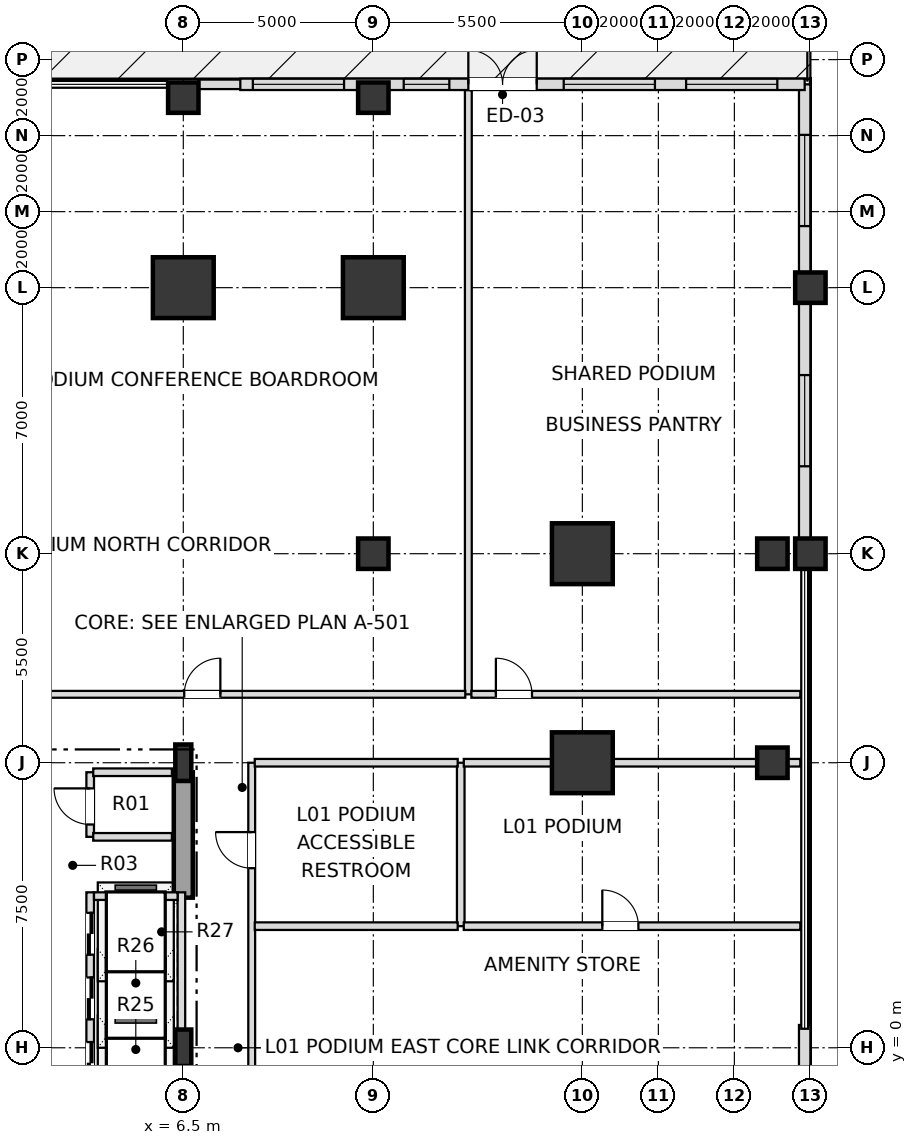
"""IFC4 building model, lengths in metres.
Left out: names, types, materials, properties, quantities, classifications, styles, units other than length and angle.
Written with IfcOpenShell. Run it as: python <this file> out.ifc"""

import sys

from ifc_helpers import new_model, si_unit, direction, frame, frame_2d, origin, origin_2d, place, context, subcontext, project, spatial, rectangle, i_section, extrude, element, fill, save


model = new_model("IFC4")
c1 = context("Model", 3, precision=1e-05, world=origin(), true_north=direction((0.0, 1.0)))
c2 = subcontext(c1, "Body", "Model", "MODEL_VIEW")
j1 = project(units=[si_unit("LENGTHUNIT", "METRE"), si_unit("PLANEANGLEUNIT", "RADIAN")], contexts=[c1])
p1 = place(None, origin())
s1 = spatial("IfcSite", under=j1, at=p1, CompositionType="ELEMENT")
p2 = place(p1, origin())
s2 = spatial("IfcBuilding", under=s1, at=p2, CompositionType="ELEMENT")
p3 = place(p2, frame((0.0, 0.0, 6.0)))
s3 = spatial("IfcBuildingStorey", under=s2, at=p3, CompositionType="ELEMENT", Elevation=6.0)
for number, where, z_axis, x_axis in (
    (1, (6.5, 0.0, 0.0), (0.0, 0.0, 1.0), (1.0, 0.0, 0.0)),
    (2, (6.5, 7.5, 0.0), (0.0, 0.0, 1.0), (1.0, 0.0, 0.0)),
):
    element("IfcColumn", number, at=place(p3, frame(where, z_axis=z_axis, x_axis=x_axis)), inside=s3, PredefinedType="COLUMN", context=c2, shape_type="SweptSolid", body=[
        extrude(i_section(OverallWidth=0.42, OverallDepth=0.96, WebThickness=0.022, FlangeThickness=0.034, at=origin_2d()), origin(), (0.0, 0.0, 1.0), 5.4),
    ])
for number, where, z_axis, x_axis in (
    (3, (17.0, 7.5, 0.0), (0.0, 0.0, 1.0), (1.0, 0.0, 0.0)),
    (4, (17.0, 13.0, 0.0), (0.0, 0.0, 1.0), (1.0, 0.0, 0.0)),
    (5, (11.5, 20.0, 0.0), (0.0, 0.0, 1.0), (1.0, 0.0, 0.0)),
    (6, (6.5, 20.0, 0.0), (0.0, 0.0, 1.0), (1.0, 0.0, 0.0)),
):
    element("IfcColumn", number, at=place(p3, frame(where, z_axis=z_axis, x_axis=x_axis)), inside=s3, PredefinedType="USERDEFINED", context=c2, shape_type="SweptSolid", body=[
        extrude(rectangle(XDim=1.6, YDim=1.6, at=origin_2d()), origin(), (0.0, 0.0, 1.0), 5.4),
    ])
for number, where, z_axis, x_axis in (
    (7, (23.0, 13.0, 0.0), (0.0, 0.0, 1.0), (1.0, 0.0, 0.0)),
    (8, (23.0, 20.0, 0.0), (0.0, 0.0, 1.0), (1.0, 0.0, 0.0)),
    (9, (11.5, 13.0, 0.0), (0.0, 0.0, 1.0), (1.0, 0.0, 0.0)),
    (10, (6.5, 25.0, 0.0), (0.0, 0.0, 1.0), (1.0, 0.0, 0.0)),
    (11, (11.5, 25.0, 0.0), (0.0, 0.0, 1.0), (1.0, 0.0, 0.0)),
    (12, (22.0, 7.5, 0.0), (0.0, 0.0, 1.0), (1.0, 0.0, 0.0)),
    (13, (22.0, 13.0, 0.0), (0.0, 0.0, 1.0), (1.0, 0.0, 0.0)),
):
    element("IfcColumn", number, at=place(p3, frame(where, z_axis=z_axis, x_axis=x_axis)), inside=s3, PredefinedType="COLUMN", context=c2, shape_type="SweptSolid", body=[
        extrude(rectangle(XDim=0.8, YDim=0.8, at=origin_2d()), origin(), (0.0, 0.0, 1.0), 5.4),
    ])
p4 = place(p3, frame((22.85, -0.6, 0.0), z_axis=(0.0, 0.0, 1.0), x_axis=(0.0, 1.0, 0.0)))
e14 = element("IfcWall", 14, at=p4, inside=s3, PredefinedType="SOLIDWALL", context=c2, shape_type="SweptSolid", body=[
    extrude(rectangle(XDim=1.2, YDim=0.3, at=frame_2d((0.6, 0.0))), origin(), (0.0, 0.0, 1.0), 4.476),
])
p5 = place(p3, frame((22.85, 13.0, 0.0), z_axis=(0.0, 0.0, 1.0), x_axis=(0.0, 1.0, 0.0)))
e15 = element("IfcWall", 15, at=p5, inside=s3, PredefinedType="SOLIDWALL", context=c2, shape_type="SweptSolid", body=[
    extrude(rectangle(XDim=12.35, YDim=0.3, at=frame_2d((6.175, 0.0))), origin(), (0.0, 0.0, 1.0), 4.476),
])
p6 = place(p5, frame((2.3, 0.0, 0.8)))
e16 = element("IfcOpeningElement", 16, at=p6, cuts=e15, PredefinedType="OPENING", context=c2, shape_type="SweptSolid", body=[
    extrude(rectangle(XDim=2.4, YDim=2.2, at=frame_2d((1.2, 1.1))), frame((0.0, 0.16, 0.0), z_axis=(0.0, -1.0, 0.0), x_axis=(1.0, 0.0, 0.0)), (0.0, 0.0, 1.0), 0.32),
])
p7 = place(p5, frame((8.62, 0.0, 0.8)))
e17 = element("IfcOpeningElement", 17, at=p7, cuts=e15, PredefinedType="OPENING", context=c2, shape_type="SweptSolid", body=[
    extrude(rectangle(XDim=2.4, YDim=2.2, at=frame_2d((1.2, 1.1))), frame((0.0, 0.16, 0.0), z_axis=(0.0, -1.0, 0.0), x_axis=(1.0, 0.0, 0.0)), (0.0, 0.0, 1.0), 0.32),
])
p8 = place(p3, frame((8.025, 25.35, 0.0), z_axis=(0.0, 0.0, 1.0), x_axis=(-1.0, 0.0, 0.0)))
e18 = element("IfcWall", 18, at=p8, inside=s3, PredefinedType="SOLIDWALL", context=c2, shape_type="SweptSolid", body=[
    extrude(rectangle(XDim=1.13, YDim=0.25, at=frame_2d((0.565, 0.0))), origin(), (0.0, 0.0, 1.0), 4.476),
])
p9 = place(p3, frame((8.0, 25.35, 0.0), z_axis=(0.0, 0.0, 1.0), x_axis=(1.0, 0.0, 0.0)))
e19 = element("IfcWall", 19, at=p9, inside=s3, PredefinedType="SOLIDWALL", context=c2, shape_type="SweptSolid", body=[
    extrude(rectangle(XDim=14.85, YDim=0.3, at=frame_2d((7.425, 0.0))), origin(), (0.0, 0.0, 1.0), 4.476),
])
p10 = place(p9, frame((6.0, 0.0, 0.0)))
e20 = element("IfcOpeningElement", 20, at=p10, cuts=e19, PredefinedType="OPENING", context=c2, shape_type="SweptSolid", body=[
    extrude(rectangle(XDim=1.8, YDim=2.3, at=frame_2d((0.9, 1.15))), frame((0.0, 0.16, 0.0), z_axis=(0.0, -1.0, 0.0), x_axis=(1.0, 0.0, 0.0)), (0.0, 0.0, 1.0), 0.32),
])
p11 = place(p9, frame((0.33, 0.0, 0.8)))
e21 = element("IfcOpeningElement", 21, at=p11, cuts=e19, PredefinedType="OPENING", context=c2, shape_type="SweptSolid", body=[
    extrude(rectangle(XDim=2.4, YDim=2.2, at=frame_2d((1.2, 1.1))), frame((0.0, 0.16, 0.0), z_axis=(0.0, -1.0, 0.0), x_axis=(1.0, 0.0, 0.0)), (0.0, 0.0, 1.0), 0.32),
])
p12 = place(p9, frame((4.3, 0.0, 0.72)))
e22 = element("IfcOpeningElement", 22, at=p12, cuts=e19, PredefinedType="OPENING", context=c2, shape_type="SweptSolid", body=[
    extrude(rectangle(XDim=1.2, YDim=1.68, at=frame_2d((0.6, 0.84))), frame((0.0, 0.16, 0.0), z_axis=(0.0, -1.0, 0.0), x_axis=(1.0, 0.0, 0.0)), (0.0, 0.0, 1.0), 0.32),
])
p13 = place(p9, frame((8.51, 0.0, 0.8)))
e23 = element("IfcOpeningElement", 23, at=p13, cuts=e19, PredefinedType="OPENING", context=c2, shape_type="SweptSolid", body=[
    extrude(rectangle(XDim=2.4, YDim=2.2, at=frame_2d((1.2, 1.1))), frame((0.0, 0.16, 0.0), z_axis=(0.0, -1.0, 0.0), x_axis=(1.0, 0.0, 0.0)), (0.0, 0.0, 1.0), 0.32),
])
p14 = place(p9, frame((11.73, 0.0, 0.8)))
e24 = element("IfcOpeningElement", 24, at=p14, cuts=e19, PredefinedType="OPENING", context=c2, shape_type="SweptSolid", body=[
    extrude(rectangle(XDim=2.4, YDim=2.2, at=frame_2d((1.2, 1.1))), frame((0.0, 0.16, 0.0), z_axis=(0.0, -1.0, 0.0), x_axis=(1.0, 0.0, 0.0)), (0.0, 0.0, 1.0), 0.32),
])
p15 = place(p3, frame((6.5, 3.95, 0.0), z_axis=(0.0, 0.0, 1.0), x_axis=(0.0, 1.0, 0.0)))
e25 = element("IfcWall", 25, at=p15, inside=s3, PredefinedType="SHEAR", context=c2, shape_type="SweptSolid", body=[
    extrude(rectangle(XDim=3.3, YDim=0.5, at=frame_2d((1.65, 0.0))), origin(), (0.0, 0.0, 1.0), 5.12),
])
p16 = place(p3, frame((4.05, -1.49, 0.0), z_axis=(0.0, 0.0, 1.0), x_axis=(0.0, 1.0, 0.0)))
e26 = element("IfcWall", 26, at=p16, inside=s3, PredefinedType="SOLIDWALL", context=c2, shape_type="SweptSolid", body=[
    extrude(rectangle(XDim=5.58, YDim=0.2, at=frame_2d((2.79, 0.0))), origin(), (0.0, 0.0, 1.0), 5.12),
])
p17 = place(p16, frame((0.54, 0.0, 0.0)))
e27 = element("IfcOpeningElement", 27, at=p17, cuts=e26, PredefinedType="OPENING", context=c2, shape_type="SweptSolid", body=[
    extrude(rectangle(XDim=1.1, YDim=2.15, at=frame_2d((0.55, 1.075))), frame((0.0, 0.11, 0.0), z_axis=(0.0, -1.0, 0.0), x_axis=(1.0, 0.0, 0.0)), (0.0, 0.0, 1.0), 0.22),
])
p18 = place(p16, frame((2.24, 0.0, 0.0)))
e28 = element("IfcOpeningElement", 28, at=p18, cuts=e26, PredefinedType="OPENING", context=c2, shape_type="SweptSolid", body=[
    extrude(rectangle(XDim=1.1, YDim=2.15, at=frame_2d((0.55, 1.075))), frame((0.0, 0.11, 0.0), z_axis=(0.0, -1.0, 0.0), x_axis=(1.0, 0.0, 0.0)), (0.0, 0.0, 1.0), 0.22),
])
p19 = place(p16, frame((3.94, 0.0, 0.0)))
e29 = element("IfcOpeningElement", 29, at=p19, cuts=e26, PredefinedType="OPENING", context=c2, shape_type="SweptSolid", body=[
    extrude(rectangle(XDim=1.1, YDim=2.15, at=frame_2d((0.55, 1.075))), frame((0.0, 0.11, 0.0), z_axis=(0.0, -1.0, 0.0), x_axis=(1.0, 0.0, 0.0)), (0.0, 0.0, 1.0), 0.22),
])
p20 = place(p3, frame((6.45, -1.49, 0.0), z_axis=(0.0, 0.0, 1.0), x_axis=(0.0, 1.0, 0.0)))
e30 = element("IfcWall", 30, at=p20, inside=s3, PredefinedType="SOLIDWALL", context=c2, shape_type="SweptSolid", body=[
    extrude(rectangle(XDim=5.58, YDim=0.2, at=frame_2d((2.79, 0.0))), origin(), (0.0, 0.0, 1.0), 4.41),
])
p21 = place(p3, frame((4.15, 3.99, 0.0), z_axis=(0.0, 0.0, 1.0), x_axis=(1.0, 0.0, 0.0)))
e31 = element("IfcWall", 31, at=p21, inside=s3, PredefinedType="SOLIDWALL", context=c2, shape_type="SweptSolid", body=[
    extrude(rectangle(XDim=2.2, YDim=0.2, at=frame_2d((1.1, 0.0))), origin(), (0.0, 0.0, 1.0), 5.12),
])
p22 = place(p3, frame((4.05, 5.55, 0.0), z_axis=(0.0, 0.0, 1.0), x_axis=(0.0, 1.0, 0.0)))
e32 = element("IfcWall", 32, at=p22, inside=s3, PredefinedType="SOLIDWALL", context=c2, shape_type="SweptSolid", body=[
    extrude(rectangle(XDim=1.7, YDim=0.2, at=frame_2d((0.85, 0.0))), origin(), (0.0, 0.0, 1.0), 5.12),
])
p23 = place(p22, frame((0.325, 0.0, 0.0)))
e33 = element("IfcOpeningElement", 33, at=p23, cuts=e32, PredefinedType="OPENING", context=c2, shape_type="SweptSolid", body=[
    extrude(rectangle(XDim=0.95, YDim=2.15, at=frame_2d((0.475, 1.075))), frame((0.0, 0.11, 0.0), z_axis=(0.0, -1.0, 0.0), x_axis=(1.0, 0.0, 0.0)), (0.0, 0.0, 1.0), 0.22),
])
p24 = place(p3, frame((8.3, -7.5, 0.0), z_axis=(0.0, 0.0, 1.0), x_axis=(0.0, 1.0, 0.0)))
e34 = element("IfcWall", 34, at=p24, inside=s3, PredefinedType="PARTITIONING", context=c2, shape_type="SweptSolid", body=[
    extrude(rectangle(XDim=15.0, YDim=0.18, at=frame_2d((7.5, 0.0))), origin(), (0.0, 0.0, 1.0), 5.12),
])
p25 = place(p24, frame((5.025, 0.0, 0.0)))
e35 = element("IfcOpeningElement", 35, at=p25, cuts=e34, PredefinedType="OPENING", context=c2, shape_type="SweptSolid", body=[
    extrude(rectangle(XDim=0.95, YDim=2.15, at=frame_2d((0.475, 1.075))), frame((0.0, 0.1, 0.0), z_axis=(0.0, -1.0, 0.0), x_axis=(1.0, 0.0, 0.0)), (0.0, 0.0, 1.0), 0.2),
])
p26 = place(p24, frame((12.225, 0.0, 0.0)))
e36 = element("IfcOpeningElement", 36, at=p26, cuts=e34, PredefinedType="OPENING", context=c2, shape_type="SweptSolid", body=[
    extrude(rectangle(XDim=0.95, YDim=2.15, at=frame_2d((0.475, 1.075))), frame((0.0, 0.1, 0.0), z_axis=(0.0, -1.0, 0.0), x_axis=(1.0, 0.0, 0.0)), (0.0, 0.0, 1.0), 0.2),
])
p27 = place(p3, frame((13.8, 3.2, 0.0), z_axis=(0.0, 0.0, 1.0), x_axis=(0.0, 1.0, 0.0)))
e37 = element("IfcWall", 37, at=p27, inside=s3, PredefinedType="SOLIDWALL", context=c2, shape_type="SweptSolid", body=[
    extrude(rectangle(XDim=4.3, YDim=0.2, at=frame_2d((2.15, 0.0))), origin(), (0.0, 0.0, 1.0), 5.12),
])
p28 = place(p3, frame((14.0, 9.3, 0.0), z_axis=(0.0, 0.0, 1.0), x_axis=(0.0, 1.0, 0.0)))
e38 = element("IfcWall", 38, at=p28, inside=s3, PredefinedType="PARTITIONING", context=c2, shape_type="SweptSolid", body=[
    extrude(rectangle(XDim=15.895, YDim=0.18, at=frame_2d((7.948, 0.0))), origin(), (0.0, 0.0, 1.0), 4.41),
])
p29 = place(p3, frame((8.38, 3.2, 0.0), z_axis=(0.0, 0.0, 1.0), x_axis=(1.0, 0.0, 0.0)))
e39 = element("IfcWall", 39, at=p29, inside=s3, PredefinedType="SOLIDWALL", context=c2, shape_type="SweptSolid", body=[
    extrude(rectangle(XDim=5.34, YDim=0.2, at=frame_2d((2.67, 0.0))), origin(), (0.0, 0.0, 1.0), 4.642),
])
p30 = place(p3, frame((13.88, 3.2, 0.0), z_axis=(0.0, 0.0, 1.0), x_axis=(1.0, 0.0, 0.0)))
e40 = element("IfcWall", 40, at=p30, inside=s3, PredefinedType="SOLIDWALL", context=c2, shape_type="SweptSolid", body=[
    extrude(rectangle(XDim=8.855, YDim=0.2, at=frame_2d((4.428, 0.0))), origin(), (0.0, 0.0, 1.0), 4.41),
])
p31 = place(p30, frame((3.645, 0.0, 0.0)))
e41 = element("IfcOpeningElement", 41, at=p31, cuts=e40, PredefinedType="OPENING", context=c2, shape_type="SweptSolid", body=[
    extrude(rectangle(XDim=0.95, YDim=2.15, at=frame_2d((0.475, 1.075))), frame((0.0, 0.11, 0.0), z_axis=(0.0, -1.0, 0.0), x_axis=(1.0, 0.0, 0.0)), (0.0, 0.0, 1.0), 0.22),
])
p32 = place(p3, frame((4.13, 5.55, 0.0), z_axis=(0.0, 0.0, 1.0), x_axis=(1.0, 0.0, 0.0)))
e42 = element("IfcWall", 42, at=p32, inside=s3, PredefinedType="SOLIDWALL", context=c2, shape_type="SweptSolid", body=[
    extrude(rectangle(XDim=2.07, YDim=0.2, at=frame_2d((1.035, 0.0))), origin(), (0.0, 0.0, 1.0), 5.12),
])
p33 = place(p3, frame((4.13, 7.25, 0.0), z_axis=(0.0, 0.0, 1.0), x_axis=(1.0, 0.0, 0.0)))
e43 = element("IfcWall", 43, at=p33, inside=s3, PredefinedType="SOLIDWALL", context=c2, shape_type="SweptSolid", body=[
    extrude(rectangle(XDim=2.07, YDim=0.2, at=frame_2d((1.035, 0.0))), origin(), (0.0, 0.0, 1.0), 4.41),
])
p34 = place(p3, frame((8.38, 7.5, 0.0), z_axis=(0.0, 0.0, 1.0), x_axis=(1.0, 0.0, 0.0)))
e44 = element("IfcWall", 44, at=p34, inside=s3, PredefinedType="SOLIDWALL", context=c2, shape_type="SweptSolid", body=[
    extrude(rectangle(XDim=5.34, YDim=0.2, at=frame_2d((2.67, 0.0))), origin(), (0.0, 0.0, 1.0), 4.41),
])
p35 = place(p3, frame((13.88, 7.5, 0.0), z_axis=(0.0, 0.0, 1.0), x_axis=(1.0, 0.0, 0.0)))
e45 = element("IfcWall", 45, at=p35, inside=s3, PredefinedType="SOLIDWALL", context=c2, shape_type="SweptSolid", body=[
    extrude(rectangle(XDim=8.855, YDim=0.2, at=frame_2d((4.428, 0.0))), origin(), (0.0, 0.0, 1.0), 4.41),
])
p36 = place(p3, frame((0.08, 9.3, 0.0), z_axis=(0.0, 0.0, 1.0), x_axis=(1.0, 0.0, 0.0)))
e46 = element("IfcWall", 46, at=p36, inside=s3, PredefinedType="PARTITIONING", context=c2, shape_type="SweptSolid", body=[
    extrude(rectangle(XDim=13.84, YDim=0.18, at=frame_2d((6.92, 0.0))), origin(), (0.0, 0.0, 1.0), 4.41),
])
p37 = place(p36, frame((6.445, 0.0, 0.0)))
e47 = element("IfcOpeningElement", 47, at=p37, cuts=e46, PredefinedType="OPENING", context=c2, shape_type="SweptSolid", body=[
    extrude(rectangle(XDim=0.95, YDim=2.15, at=frame_2d((0.475, 1.075))), frame((0.0, 0.1, 0.0), z_axis=(0.0, -1.0, 0.0), x_axis=(1.0, 0.0, 0.0)), (0.0, 0.0, 1.0), 0.2),
])
p38 = place(p3, frame((14.08, 9.3, 0.0), z_axis=(0.0, 0.0, 1.0), x_axis=(1.0, 0.0, 0.0)))
e48 = element("IfcWall", 48, at=p38, inside=s3, PredefinedType="PARTITIONING", context=c2, shape_type="SweptSolid", body=[
    extrude(rectangle(XDim=8.655, YDim=0.18, at=frame_2d((4.328, 0.0))), origin(), (0.0, 0.0, 1.0), 4.41),
])
p39 = place(p38, frame((0.645, 0.0, 0.0)))
e49 = element("IfcOpeningElement", 49, at=p39, cuts=e48, PredefinedType="OPENING", context=c2, shape_type="SweptSolid", body=[
    extrude(rectangle(XDim=0.95, YDim=2.15, at=frame_2d((0.475, 1.075))), frame((0.0, 0.1, 0.0), z_axis=(0.0, -1.0, 0.0), x_axis=(1.0, 0.0, 0.0)), (0.0, 0.0, 1.0), 0.2),
])
p40 = place(p6, origin())
e50 = element("IfcWindow", 50, at=p40, inside=s3, PartitioningType="SINGLE_PANEL", PredefinedType="WINDOW", context=c2, shape_type="SweptSolid", body=[
    extrude(rectangle(XDim=2.4, YDim=2.2, at=frame_2d((1.2, 1.1))), frame((0.0, 0.03, 0.0), z_axis=(0.0, -1.0, 0.0), x_axis=(1.0, 0.0, 0.0)), (0.0, 0.0, 1.0), 0.06),
])
fill(e16, e50)
p41 = place(p7, origin())
e51 = element("IfcWindow", 51, at=p41, inside=s3, PartitioningType="SINGLE_PANEL", PredefinedType="WINDOW", context=c2, shape_type="SweptSolid", body=[
    extrude(rectangle(XDim=2.4, YDim=2.2, at=frame_2d((1.2, 1.1))), frame((0.0, 0.03, 0.0), z_axis=(0.0, -1.0, 0.0), x_axis=(1.0, 0.0, 0.0)), (0.0, 0.0, 1.0), 0.06),
])
fill(e17, e51)
p42 = place(p10, origin())
e52 = element("IfcDoor", 52, at=p42, inside=s3, OperationType="DOUBLE_DOOR_SINGLE_SWING", PredefinedType="DOOR", context=c2, shape_type="SweptSolid", body=[
    extrude(rectangle(XDim=1.8, YDim=2.3, at=frame_2d((0.9, 1.15))), frame((0.0, 0.025, 0.0), z_axis=(0.0, -1.0, 0.0), x_axis=(1.0, 0.0, 0.0)), (0.0, 0.0, 1.0), 0.05),
])
fill(e20, e52)
p43 = place(p11, origin())
e53 = element("IfcWindow", 53, at=p43, inside=s3, PartitioningType="SINGLE_PANEL", PredefinedType="WINDOW", context=c2, shape_type="SweptSolid", body=[
    extrude(rectangle(XDim=2.4, YDim=2.2, at=frame_2d((1.2, 1.1))), frame((0.0, 0.03, 0.0), z_axis=(0.0, -1.0, 0.0), x_axis=(1.0, 0.0, 0.0)), (0.0, 0.0, 1.0), 0.06),
])
fill(e21, e53)
p44 = place(p12, origin())
e54 = element("IfcWindow", 54, at=p44, inside=s3, PartitioningType="SINGLE_PANEL", PredefinedType="WINDOW", context=c2, shape_type="SweptSolid", body=[
    extrude(rectangle(XDim=1.2, YDim=1.68, at=frame_2d((0.6, 0.84))), frame((0.0, 0.03, 0.0), z_axis=(0.0, -1.0, 0.0), x_axis=(1.0, 0.0, 0.0)), (0.0, 0.0, 1.0), 0.06),
])
fill(e22, e54)
p45 = place(p13, origin())
e55 = element("IfcWindow", 55, at=p45, inside=s3, PartitioningType="SINGLE_PANEL", PredefinedType="WINDOW", context=c2, shape_type="SweptSolid", body=[
    extrude(rectangle(XDim=2.4, YDim=2.2, at=frame_2d((1.2, 1.1))), frame((0.0, 0.03, 0.0), z_axis=(0.0, -1.0, 0.0), x_axis=(1.0, 0.0, 0.0)), (0.0, 0.0, 1.0), 0.06),
])
fill(e23, e55)
p46 = place(p14, origin())
e56 = element("IfcWindow", 56, at=p46, inside=s3, PartitioningType="SINGLE_PANEL", PredefinedType="WINDOW", context=c2, shape_type="SweptSolid", body=[
    extrude(rectangle(XDim=2.4, YDim=2.2, at=frame_2d((1.2, 1.1))), frame((0.0, 0.03, 0.0), z_axis=(0.0, -1.0, 0.0), x_axis=(1.0, 0.0, 0.0)), (0.0, 0.0, 1.0), 0.06),
])
fill(e24, e56)
p47 = place(p17, origin())
e57 = element("IfcDoor", 57, at=p47, inside=s3, OperationType="DOUBLE_DOOR_SLIDING", PredefinedType="DOOR", context=c2, shape_type="SweptSolid", body=[
    extrude(rectangle(XDim=1.1, YDim=2.15, at=frame_2d((0.55, 1.075))), frame((0.0, 0.025, 0.0), z_axis=(0.0, -1.0, 0.0), x_axis=(1.0, 0.0, 0.0)), (0.0, 0.0, 1.0), 0.05),
])
fill(e27, e57)
p48 = place(p18, origin())
e58 = element("IfcDoor", 58, at=p48, inside=s3, OperationType="DOUBLE_DOOR_SLIDING", PredefinedType="DOOR", context=c2, shape_type="SweptSolid", body=[
    extrude(rectangle(XDim=1.1, YDim=2.15, at=frame_2d((0.55, 1.075))), frame((0.0, 0.025, 0.0), z_axis=(0.0, -1.0, 0.0), x_axis=(1.0, 0.0, 0.0)), (0.0, 0.0, 1.0), 0.05),
])
fill(e28, e58)
p49 = place(p19, origin())
e59 = element("IfcDoor", 59, at=p49, inside=s3, OperationType="DOUBLE_DOOR_SLIDING", PredefinedType="DOOR", context=c2, shape_type="SweptSolid", body=[
    extrude(rectangle(XDim=1.1, YDim=2.15, at=frame_2d((0.55, 1.075))), frame((0.0, 0.025, 0.0), z_axis=(0.0, -1.0, 0.0), x_axis=(1.0, 0.0, 0.0)), (0.0, 0.0, 1.0), 0.05),
])
fill(e29, e59)
p50 = place(p23, origin())
e60 = element("IfcDoor", 60, at=p50, inside=s3, OperationType="SINGLE_SWING_RIGHT", PredefinedType="DOOR", context=c2, shape_type="SweptSolid", body=[
    extrude(rectangle(XDim=0.95, YDim=2.15, at=frame_2d((0.475, 1.075))), frame((0.0, 0.025, 0.0), z_axis=(0.0, -1.0, 0.0), x_axis=(1.0, 0.0, 0.0)), (0.0, 0.0, 1.0), 0.05),
])
fill(e33, e60)
p51 = place(p37, origin())
e61 = element("IfcDoor", 61, at=p51, inside=s3, OperationType="SINGLE_SWING_RIGHT", PredefinedType="DOOR", context=c2, shape_type="SweptSolid", body=[
    extrude(rectangle(XDim=0.95, YDim=2.15, at=frame_2d((0.475, 1.075))), frame((0.0, 0.025, 0.0), z_axis=(0.0, -1.0, 0.0), x_axis=(1.0, 0.0, 0.0)), (0.0, 0.0, 1.0), 0.05),
])
fill(e47, e61)
p52 = place(p39, origin())
e62 = element("IfcDoor", 62, at=p52, inside=s3, OperationType="SINGLE_SWING_LEFT", PredefinedType="DOOR", context=c2, shape_type="SweptSolid", body=[
    extrude(rectangle(XDim=0.95, YDim=2.15, at=frame_2d((0.475, 1.075))), frame((0.0, 0.025, 0.0), z_axis=(0.0, -1.0, 0.0), x_axis=(1.0, 0.0, 0.0)), (0.0, 0.0, 1.0), 0.05),
])
fill(e49, e62)
p53 = place(p26, origin())
e63 = element("IfcDoor", 63, at=p53, inside=s3, OperationType="SINGLE_SWING_RIGHT", PredefinedType="DOOR", context=c2, shape_type="SweptSolid", body=[
    extrude(rectangle(XDim=0.95, YDim=2.15, at=frame_2d((0.475, 1.075))), frame((0.0, 0.025, 0.0), z_axis=(0.0, -1.0, 0.0), x_axis=(1.0, 0.0, 0.0)), (0.0, 0.0, 1.0), 0.05),
])
fill(e36, e63)
p54 = place(p31, origin())
e64 = element("IfcDoor", 64, at=p54, inside=s3, OperationType="SINGLE_SWING_LEFT", PredefinedType="DOOR", context=c2, shape_type="SweptSolid", body=[
    extrude(rectangle(XDim=0.95, YDim=2.15, at=frame_2d((0.475, 1.075))), frame((0.0, 0.025, 0.0), z_axis=(0.0, -1.0, 0.0), x_axis=(1.0, 0.0, 0.0)), (0.0, 0.0, 1.0), 0.05),
])
fill(e41, e64)
save(model, sys.argv[1])
